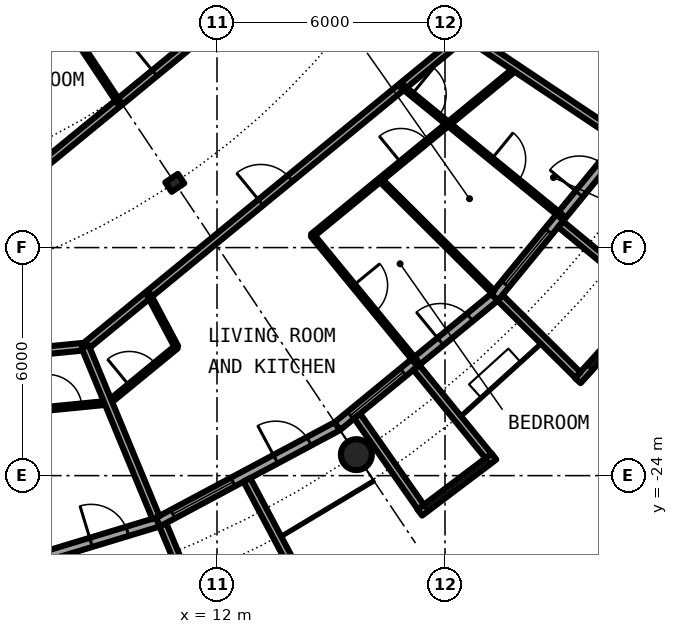
"""IFC4 building model, lengths in metres.
Left out: names, types, materials, properties, quantities, classifications, styles, units other than length and angle.
Written with IfcOpenShell. Run it as: python <this file> out.ifc"""

import sys

from ifc_helpers import new_model, si_unit, direction, frame, frame_2d, origin, origin_2d, place, context, subcontext, project, spatial, rectangle, circle, hollow_circle, i_section, extrude, element, fill, save


model = new_model("IFC4")
c1 = context("Model", 3, precision=1e-05, world=origin(), true_north=direction((0.0, 1.0)))
c2 = subcontext(c1, "Body", "Model", "MODEL_VIEW")
j1 = project(units=[si_unit("LENGTHUNIT", "METRE"), si_unit("PLANEANGLEUNIT", "RADIAN")], contexts=[c1])
p1 = place(None, origin())
s1 = spatial("IfcSite", under=j1, at=p1, CompositionType="ELEMENT")
p2 = place(p1, origin())
s2 = spatial("IfcBuilding", under=s1, at=p2, CompositionType="ELEMENT")
p3 = place(p2, frame((0.0, 0.0, 202.4)))
s3 = spatial("IfcBuildingStorey", under=s2, at=p3, CompositionType="ELEMENT", Elevation=202.4)
p4 = place(p3, frame((15.667, -23.448, 0.0), z_axis=(0.0, 0.0, 1.0), x_axis=(1.0, 0.0, 0.0)))
e1 = element("IfcColumn", 1, at=p4, inside=s3, PredefinedType="COLUMN", context=c2, shape_type="SweptSolid", body=[
    extrude(hollow_circle(Radius=0.406, WallThickness=0.03, at=origin_2d()), origin(), (0.0, 0.0, 1.0), 3.05),
])
p5 = place(p3, frame((10.889, -16.297, 0.0), z_axis=(0.0, 0.0, 1.0), x_axis=(0.55557023302, -0.831469612303, 0.0)))
e2 = element("IfcColumn", 2, at=p5, inside=s3, PredefinedType="COLUMN", context=c2, shape_type="SweptSolid", body=[
    extrude(i_section(OverallWidth=0.3, OverallDepth=0.4, WebThickness=0.013, FlangeThickness=0.024, FilletRadius=0.027, at=origin_2d()), origin(), (0.0, 0.0, 1.0), 3.05),
])
p6 = place(p3, frame((5.326, -26.775, 0.0), z_axis=(0.0, 0.0, 1.0), x_axis=(0.956965678721, 0.290201119486, 0.0)))
e3 = element("IfcWall", 3, at=p6, inside=s3, PredefinedType="SOLIDWALL", context=c2, shape_type="SweptSolid", body=[
    extrude(rectangle(XDim=5.351, YDim=0.25, at=frame_2d((2.676, 0.0))), origin(), (0.0, 0.0, 1.0), 2.7),
])
p7 = place(p6, frame((0.441, 0.0, 0.3)))
e4 = element("IfcOpeningElement", 4, at=p7, cuts=e3, PredefinedType="OPENING", context=c2, shape_type="SweptSolid", body=[
    extrude(rectangle(XDim=1.8, YDim=2.1, at=frame_2d((0.9, 1.05))), frame((0.0, 0.135, 0.0), z_axis=(0.0, -1.0, 0.0), x_axis=(1.0, 0.0, 0.0)), (0.0, 0.0, 1.0), 0.27),
])
p8 = place(p6, frame((3.51, 0.0, 0.0)))
e5 = element("IfcOpeningElement", 5, at=p8, cuts=e3, PredefinedType="OPENING", context=c2, shape_type="SweptSolid", body=[
    extrude(rectangle(XDim=1.0, YDim=2.2, at=frame_2d((0.5, 1.1))), frame((0.0, 0.135, 0.0), z_axis=(0.0, -1.0, 0.0), x_axis=(1.0, 0.0, 0.0)), (0.0, 0.0, 1.0), 0.27),
])
p9 = place(p3, frame((10.447, -25.222, 0.0), z_axis=(0.0, 0.0, 1.0), x_axis=(0.881915646801, 0.471407246368, 0.0)))
e6 = element("IfcWall", 6, at=p9, inside=s3, PredefinedType="SOLIDWALL", context=c2, shape_type="SweptSolid", body=[
    extrude(rectangle(XDim=5.352, YDim=0.25, at=frame_2d((2.676, 0.0))), origin(), (0.0, 0.0, 1.0), 2.7),
])
p10 = place(p9, frame((0.441, 0.0, 0.3)))
e7 = element("IfcOpeningElement", 7, at=p10, cuts=e6, PredefinedType="OPENING", context=c2, shape_type="SweptSolid", body=[
    extrude(rectangle(XDim=1.8, YDim=2.1, at=frame_2d((0.9, 1.05))), frame((0.0, 0.135, 0.0), z_axis=(0.0, -1.0, 0.0), x_axis=(1.0, 0.0, 0.0)), (0.0, 0.0, 1.0), 0.27),
])
p11 = place(p9, frame((3.51, 0.0, 0.0)))
e8 = element("IfcOpeningElement", 8, at=p11, cuts=e6, PredefinedType="OPENING", context=c2, shape_type="SweptSolid", body=[
    extrude(rectangle(XDim=1.0, YDim=2.2, at=frame_2d((0.5, 1.1))), frame((0.0, 0.135, 0.0), z_axis=(0.0, -1.0, 0.0), x_axis=(1.0, 0.0, 0.0)), (0.0, 0.0, 1.0), 0.27),
])
p12 = place(p3, frame((10.575, -25.295, -0.03), z_axis=(0.0, 0.0, 1.0), x_axis=(0.385697364644, -0.922625353492, 0.0)))
e9 = element("IfcWall", 9, at=p12, inside=s3, PredefinedType="SOLIDWALL", context=c2, shape_type="SweptSolid", body=[
    extrude(rectangle(XDim=2.883, YDim=0.2, at=frame_2d((1.442, 0.0))), origin(), (0.0, 0.0, 1.0), 2.73),
])
p13 = place(p3, frame((12.787, -24.113, -0.03), z_axis=(0.0, 0.0, 1.0), x_axis=(0.468365282436, -0.883534924159, 0.0)))
e10 = element("IfcWall", 10, at=p13, inside=s3, PredefinedType="SOLIDWALL", context=c2, shape_type="SweptSolid", body=[
    extrude(rectangle(XDim=3.006, YDim=0.2, at=frame_2d((1.503, 0.0))), origin(), (0.0, 0.0, 1.0), 2.73),
])
p14 = place(p3, frame((15.167, -22.699, 0.0), z_axis=(0.0, 0.0, 1.0), x_axis=(0.773019449054, 0.634382322723, 0.0)))
e11 = element("IfcWall", 11, at=p14, inside=s3, PredefinedType="SOLIDWALL", context=c2, shape_type="SweptSolid", body=[
    extrude(rectangle(XDim=5.352, YDim=0.25, at=frame_2d((2.676, 0.0))), origin(), (0.0, 0.0, 1.0), 2.7),
])
p15 = place(p14, frame((0.441, 0.0, 0.3)))
e12 = element("IfcOpeningElement", 12, at=p15, cuts=e11, PredefinedType="OPENING", context=c2, shape_type="SweptSolid", body=[
    extrude(rectangle(XDim=1.8, YDim=2.1, at=frame_2d((0.9, 1.05))), frame((0.0, 0.135, 0.0), z_axis=(0.0, -1.0, 0.0), x_axis=(1.0, 0.0, 0.0)), (0.0, 0.0, 1.0), 0.27),
])
p16 = place(p14, frame((3.51, 0.0, 0.0)))
e13 = element("IfcOpeningElement", 13, at=p16, cuts=e11, PredefinedType="OPENING", context=c2, shape_type="SweptSolid", body=[
    extrude(rectangle(XDim=1.0, YDim=2.2, at=frame_2d((0.5, 1.1))), frame((0.0, 0.135, 0.0), z_axis=(0.0, -1.0, 0.0), x_axis=(1.0, 0.0, 0.0)), (0.0, 0.0, 1.0), 0.27),
])
p17 = place(p3, frame((17.337, -24.972, -0.03), z_axis=(0.0, 0.0, 1.0), x_axis=(0.797887588059, 0.602806268067, 0.0)))
e14 = element("IfcWall", 14, at=p17, inside=s3, PredefinedType="SOLIDWALL", context=c2, shape_type="SweptSolid", body=[
    extrude(rectangle(XDim=2.447, YDim=0.2, at=frame_2d((1.223, 0.0))), origin(), (0.0, 0.0, 1.0), 2.73),
])
p18 = place(p17, frame((0.183, 0.0, 0.33)))
e15 = element("IfcOpeningElement", 15, at=p18, cuts=e14, PredefinedType="OPENING", context=c2, shape_type="SweptSolid", body=[
    extrude(circle(Radius=1.04, at=frame_2d((1.04, 1.04))), frame((0.0, 0.11, 0.0), z_axis=(0.0, -1.0, 0.0), x_axis=(1.0, 0.0, 0.0)), (0.0, 0.0, 1.0), 0.22),
])
p19 = place(p3, frame((15.688, -22.433, -0.03), z_axis=(0.0, 0.0, 1.0), x_axis=(0.573260687834, -0.819373043115, 0.0)))
e16 = element("IfcWall", 16, at=p19, inside=s3, PredefinedType="SOLIDWALL", context=c2, shape_type="SweptSolid", body=[
    extrude(rectangle(XDim=2.925, YDim=0.2, at=frame_2d((1.463, 0.0))), origin(), (0.0, 0.0, 1.0), 2.73),
])
p20 = place(p3, frame((17.246, -21.155, -0.03), z_axis=(0.0, 0.0, 1.0), x_axis=(0.631741648902, -0.775179004516, 0.0)))
e17 = element("IfcWall", 17, at=p20, inside=s3, PredefinedType="SOLIDWALL", context=c2, shape_type="SweptSolid", body=[
    extrude(rectangle(XDim=3.006, YDim=0.2, at=frame_2d((1.503, 0.0))), origin(), (0.0, 0.0, 1.0), 2.73),
])
p21 = place(p3, frame((19.304, -19.304, 0.0), z_axis=(0.0, 0.0, 1.0), x_axis=(0.634382322723, 0.773019449054, 0.0)))
e18 = element("IfcWall", 18, at=p21, inside=s3, PredefinedType="SOLIDWALL", context=c2, shape_type="SweptSolid", body=[
    extrude(rectangle(XDim=5.352, YDim=0.25, at=frame_2d((2.676, 0.0))), origin(), (0.0, 0.0, 1.0), 2.7),
])
p22 = place(p21, frame((0.441, 0.0, 0.3)))
e19 = element("IfcOpeningElement", 19, at=p22, cuts=e18, PredefinedType="OPENING", context=c2, shape_type="SweptSolid", body=[
    extrude(rectangle(XDim=1.8, YDim=2.1, at=frame_2d((0.9, 1.05))), frame((0.0, 0.135, 0.0), z_axis=(0.0, -1.0, 0.0), x_axis=(1.0, 0.0, 0.0)), (0.0, 0.0, 1.0), 0.27),
])
p23 = place(p21, frame((3.51, 0.0, 0.0)))
e20 = element("IfcOpeningElement", 20, at=p23, cuts=e18, PredefinedType="OPENING", context=c2, shape_type="SweptSolid", body=[
    extrude(rectangle(XDim=1.0, YDim=2.2, at=frame_2d((0.5, 1.1))), frame((0.0, 0.135, 0.0), z_axis=(0.0, -1.0, 0.0), x_axis=(1.0, 0.0, 0.0)), (0.0, 0.0, 1.0), 0.27),
])
p24 = place(p3, frame((21.493, -21.5, -0.03), z_axis=(0.0, 0.0, 1.0), x_axis=(0.671506829416, 0.740998365753, 0.0)))
e21 = element("IfcWall", 21, at=p24, inside=s3, PredefinedType="SOLIDWALL", context=c2, shape_type="SweptSolid", body=[
    extrude(rectangle(XDim=2.993, YDim=0.2, at=frame_2d((1.497, 0.0))), origin(), (0.0, 0.0, 1.0), 2.73),
])
p25 = place(p24, frame((0.457, 0.0, 0.33)))
e22 = element("IfcOpeningElement", 22, at=p25, cuts=e21, PredefinedType="OPENING", context=c2, shape_type="SweptSolid", body=[
    extrude(circle(Radius=1.04, at=frame_2d((1.04, 1.04))), frame((0.0, 0.11, 0.0), z_axis=(0.0, -1.0, 0.0), x_axis=(1.0, 0.0, 0.0)), (0.0, 0.0, 1.0), 0.22),
])
p26 = place(p3, frame((19.45, -19.323, -0.03), z_axis=(0.0, 0.0, 1.0), x_axis=(0.709727076896, -0.704476739375, 0.0)))
e23 = element("IfcWall", 23, at=p26, inside=s3, PredefinedType="SOLIDWALL", context=c2, shape_type="SweptSolid", body=[
    extrude(rectangle(XDim=2.883, YDim=0.2, at=frame_2d((1.441, 0.0))), origin(), (0.0, 0.0, 1.0), 2.73),
])
p27 = place(p3, frame((21.041, -17.384, -0.03), z_axis=(0.0, 0.0, 1.0), x_axis=(0.770784861449, -0.63709551667, 0.0)))
e24 = element("IfcWall", 24, at=p27, inside=s3, PredefinedType="SOLIDWALL", context=c2, shape_type="SweptSolid", body=[
    extrude(rectangle(XDim=3.006, YDim=0.2, at=frame_2d((1.503, 0.0))), origin(), (0.0, 0.0, 1.0), 2.73),
])
p28 = place(p3, frame((6.85, -22.308, 0.0), z_axis=(0.0, 0.0, 1.0), x_axis=(0.995161915602, 0.098248469375, 0.0)))
e25 = element("IfcWall", 25, at=p28, inside=s3, PredefinedType="PARTITIONING", context=c2, shape_type="SweptSolid", body=[
    extrude(rectangle(XDim=2.311, YDim=0.1, at=frame_2d((1.156, 0.0))), origin(), (0.0, 0.0, 1.0), 2.7),
])
p29 = place(p28, frame((0.701, 0.0, 0.0)))
e26 = element("IfcOpeningElement", 26, at=p29, cuts=e25, PredefinedType="OPENING", context=c2, shape_type="SweptSolid", body=[
    extrude(rectangle(XDim=0.9, YDim=2.3, at=frame_2d((0.45, 1.15))), frame((0.0, 0.06, 0.0), z_axis=(0.0, -1.0, 0.0), x_axis=(1.0, 0.0, 0.0)), (0.0, 0.0, 1.0), 0.12),
])
p30 = place(p3, frame((9.146, -22.081, 0.0), z_axis=(0.0, 0.0, 1.0), x_axis=(0.773095932958, 0.634289112663, 0.0)))
e27 = element("IfcWall", 27, at=p30, inside=s3, PredefinedType="PARTITIONING", context=c2, shape_type="SweptSolid", body=[
    extrude(rectangle(XDim=2.313, YDim=0.1, at=frame_2d((1.156, 0.0))), origin(), (0.0, 0.0, 1.0), 2.7),
])
p31 = place(p30, frame((0.706, 0.0, 0.0)))
e28 = element("IfcOpeningElement", 28, at=p31, cuts=e27, PredefinedType="OPENING", context=c2, shape_type="SweptSolid", body=[
    extrude(rectangle(XDim=0.9, YDim=2.3, at=frame_2d((0.45, 1.15))), frame((0.0, 0.06, 0.0), z_axis=(0.0, -1.0, 0.0), x_axis=(1.0, 0.0, 0.0)), (0.0, 0.0, 1.0), 0.12),
])
p32 = place(p3, frame((14.507, -17.682, 0.0), z_axis=(0.0, 0.0, 1.0), x_axis=(0.773143248755, 0.634231437966, 0.0)))
e29 = element("IfcWall", 29, at=p32, inside=s3, PredefinedType="PARTITIONING", context=c2, shape_type="SweptSolid", body=[
    extrude(rectangle(XDim=6.94, YDim=0.1, at=frame_2d((3.47, 0.0))), origin(), (0.0, 0.0, 1.0), 2.7),
])
p33 = place(p32, frame((3.021, 0.0, 0.0)))
e30 = element("IfcOpeningElement", 30, at=p33, cuts=e29, PredefinedType="OPENING", context=c2, shape_type="SweptSolid", body=[
    extrude(rectangle(XDim=0.9, YDim=2.3, at=frame_2d((0.45, 1.15))), frame((0.0, 0.06, 0.0), z_axis=(0.0, -1.0, 0.0), x_axis=(1.0, 0.0, 0.0)), (0.0, 0.0, 1.0), 0.12),
])
p34 = place(p3, frame((-4.355, -21.872, 0.0), z_axis=(0.0, 0.0, 1.0), x_axis=(0.995184945277, 0.098014920772, 0.0)))
e31 = element("IfcWall", 31, at=p34, inside=s3, PredefinedType="PARTITIONING", context=c2, shape_type="SweptSolid", body=[
    extrude(rectangle(XDim=12.958, YDim=0.2, at=frame_2d((6.479, 0.0))), origin(), (0.0, 0.0, 1.0), 2.7),
])
p35 = place(p34, frame((5.978, 0.0, 0.0)))
e32 = element("IfcOpeningElement", 32, at=p35, cuts=e31, PredefinedType="OPENING", context=c2, shape_type="SweptSolid", body=[
    extrude(rectangle(XDim=1.0, YDim=2.3, at=frame_2d((0.5, 1.15))), frame((0.0, 0.11, 0.0), z_axis=(0.0, -1.0, 0.0), x_axis=(1.0, 0.0, 0.0)), (0.0, 0.0, 1.0), 0.22),
])
p36 = place(p3, frame((8.534, -20.603, 0.0), z_axis=(0.0, 0.0, 1.0), x_axis=(0.772983503654, 0.634426121056, 0.0)))
e33 = element("IfcWall", 33, at=p36, inside=s3, PredefinedType="PARTITIONING", context=c2, shape_type="SweptSolid", body=[
    extrude(rectangle(XDim=12.947, YDim=0.2, at=frame_2d((6.474, 0.0))), origin(), (0.0, 0.0, 1.0), 2.7),
])
p37 = place(p36, frame((5.974, 0.0, 0.0)))
e34 = element("IfcOpeningElement", 34, at=p37, cuts=e33, PredefinedType="OPENING", context=c2, shape_type="SweptSolid", body=[
    extrude(rectangle(XDim=1.0, YDim=2.3, at=frame_2d((0.5, 1.15))), frame((0.0, 0.11, 0.0), z_axis=(0.0, -1.0, 0.0), x_axis=(1.0, 0.0, 0.0)), (0.0, 0.0, 1.0), 0.22),
])
p38 = place(p3, frame((6.773, -16.353, 0.0), z_axis=(0.0, 0.0, 1.0), x_axis=(0.773034536097, 0.634363938131, 0.0)))
e35 = element("IfcWall", 35, at=p38, inside=s3, PredefinedType="PARTITIONING", context=c2, shape_type="SweptSolid", body=[
    extrude(rectangle(XDim=10.277, YDim=0.2, at=frame_2d((5.138, 0.0))), origin(), (0.0, 0.0, 1.0), 2.7),
])
p39 = place(p38, frame((4.638, 0.0, 0.0)))
e36 = element("IfcOpeningElement", 36, at=p39, cuts=e35, PredefinedType="OPENING", context=c2, shape_type="SweptSolid", body=[
    extrude(rectangle(XDim=1.0, YDim=2.3, at=frame_2d((0.5, 1.15))), frame((0.0, 0.11, 0.0), z_axis=(0.0, -1.0, 0.0), x_axis=(1.0, 0.0, 0.0)), (0.0, 0.0, 1.0), 0.22),
])
p40 = place(p3, frame((7.028, -10.584, 0.0), z_axis=(0.0, 0.0, 1.0), x_axis=(0.553303732327, -0.832979579457, 0.0)))
e37 = element("IfcWall", 37, at=p40, inside=s3, PredefinedType="PARTITIONING", context=c2, shape_type="SweptSolid", body=[
    extrude(rectangle(XDim=4.319, YDim=0.1, at=frame_2d((2.16, 0.0))), origin(), (0.0, 0.0, 1.0), 2.7),
])
p41 = place(p40, frame((1.71, 0.0, 0.0)))
e38 = element("IfcOpeningElement", 38, at=p41, cuts=e37, PredefinedType="OPENING", context=c2, shape_type="SweptSolid", body=[
    extrude(rectangle(XDim=0.9, YDim=2.3, at=frame_2d((0.45, 1.15))), frame((0.0, 0.06, 0.0), z_axis=(0.0, -1.0, 0.0), x_axis=(1.0, 0.0, 0.0)), (0.0, 0.0, 1.0), 0.12),
])
p42 = place(p3, frame((8.53, -20.605, 0.0), z_axis=(0.0, 0.0, 1.0), x_axis=(0.382651153718, -0.923892902104, 0.0)))
e39 = element("IfcWall", 39, at=p42, inside=s3, PredefinedType="PARTITIONING", context=c2, shape_type="SweptSolid", body=[
    extrude(rectangle(XDim=4.874, YDim=0.2, at=frame_2d((2.437, 0.0))), origin(), (0.0, 0.0, 1.0), 2.7),
])
p43 = place(p3, frame((10.202, -19.234, 0.0), z_axis=(0.0, 0.0, 1.0), x_axis=(0.468648615763, -0.88338466986, 0.0)))
e40 = element("IfcWall", 40, at=p43, inside=s3, PredefinedType="PARTITIONING", context=c2, shape_type="SweptSolid", body=[
    extrude(rectangle(XDim=1.562, YDim=0.1, at=frame_2d((0.781, 0.0))), origin(), (0.0, 0.0, 1.0), 2.7),
])
p44 = place(p3, frame((14.509, -17.679, 0.0), z_axis=(0.0, 0.0, 1.0), x_axis=(0.634342681687, -0.77305197897, 0.0)))
e41 = element("IfcWall", 41, at=p44, inside=s3, PredefinedType="PARTITIONING", context=c2, shape_type="SweptSolid", body=[
    extrude(rectangle(XDim=4.305, YDim=0.1, at=frame_2d((2.153, 0.0))), origin(), (0.0, 0.0, 1.0), 2.7),
])
p45 = place(p44, frame((1.703, 0.0, 0.0)))
e42 = element("IfcOpeningElement", 42, at=p45, cuts=e41, PredefinedType="OPENING", context=c2, shape_type="SweptSolid", body=[
    extrude(rectangle(XDim=0.9, YDim=2.3, at=frame_2d((0.45, 1.15))), frame((0.0, 0.06, 0.0), z_axis=(0.0, -1.0, 0.0), x_axis=(1.0, 0.0, 0.0)), (0.0, 0.0, 1.0), 0.12),
])
p46 = place(p3, frame((16.295, -16.214, 0.0), z_axis=(0.0, 0.0, 1.0), x_axis=(0.709028177231, -0.705180149956, 0.0)))
e43 = element("IfcWall", 43, at=p46, inside=s3, PredefinedType="PARTITIONING", context=c2, shape_type="SweptSolid", body=[
    extrude(rectangle(XDim=4.188, YDim=0.1, at=frame_2d((2.094, 0.0))), origin(), (0.0, 0.0, 1.0), 2.7),
])
p47 = place(p3, frame((16.874, -13.758, 0.0), z_axis=(0.0, 0.0, 1.0), x_axis=(0.774926754572, -0.632051046236, 0.0)))
e44 = element("IfcWall", 44, at=p47, inside=s3, PredefinedType="PARTITIONING", context=c2, shape_type="SweptSolid", body=[
    extrude(rectangle(XDim=5.403, YDim=0.1, at=frame_2d((2.702, 0.0))), origin(), (0.0, 0.0, 1.0), 2.7),
])
p48 = place(p47, frame((0.331, 0.0, 0.0)))
e45 = element("IfcOpeningElement", 45, at=p48, cuts=e44, PredefinedType="OPENING", context=c2, shape_type="SweptSolid", body=[
    extrude(rectangle(XDim=0.9, YDim=2.3, at=frame_2d((0.45, 1.15))), frame((0.0, 0.06, 0.0), z_axis=(0.0, -1.0, 0.0), x_axis=(1.0, 0.0, 0.0)), (0.0, 0.0, 1.0), 0.12),
])
p49 = place(p47, frame((3.032, 0.0, 0.0)))
e46 = element("IfcOpeningElement", 46, at=p49, cuts=e44, PredefinedType="OPENING", context=c2, shape_type="SweptSolid", body=[
    extrude(rectangle(XDim=0.9, YDim=2.3, at=frame_2d((0.45, 1.15))), frame((0.0, 0.06, 0.0), z_axis=(0.0, -1.0, 0.0), x_axis=(1.0, 0.0, 0.0)), (0.0, 0.0, 1.0), 0.12),
])
p50 = place(p3, frame((18.542, -12.389, 0.0), z_axis=(0.0, 0.0, 1.0), x_axis=(0.831387096605, -0.55569370664, 0.0)))
e47 = element("IfcWall", 47, at=p50, inside=s3, PredefinedType="PARTITIONING", context=c2, shape_type="SweptSolid", body=[
    extrude(rectangle(XDim=4.875, YDim=0.2, at=frame_2d((2.438, 0.0))), origin(), (0.0, 0.0, 1.0), 2.7),
])
p51 = place(p8, origin())
e48 = element("IfcDoor", 48, at=p51, inside=s3, OperationType="SINGLE_SWING_LEFT", PredefinedType="DOOR", context=c2, shape_type="SweptSolid", body=[
    extrude(rectangle(XDim=1.0, YDim=2.2, at=frame_2d((0.5, 1.1))), frame((0.0, 0.025, 0.0), z_axis=(0.0, -1.0, 0.0), x_axis=(1.0, 0.0, 0.0)), (0.0, 0.0, 1.0), 0.05),
])
fill(e5, e48)
p52 = place(p10, origin())
e49 = element("IfcWindow", 49, at=p52, inside=s3, PartitioningType="SINGLE_PANEL", PredefinedType="WINDOW", context=c2, shape_type="SweptSolid", body=[
    extrude(rectangle(XDim=1.8, YDim=2.1, at=frame_2d((0.9, 1.05))), frame((0.0, 0.03, 0.0), z_axis=(0.0, -1.0, 0.0), x_axis=(1.0, 0.0, 0.0)), (0.0, 0.0, 1.0), 0.06),
])
fill(e7, e49)
p53 = place(p11, origin())
e50 = element("IfcDoor", 50, at=p53, inside=s3, OperationType="SINGLE_SWING_LEFT", PredefinedType="DOOR", context=c2, shape_type="SweptSolid", body=[
    extrude(rectangle(XDim=1.0, YDim=2.2, at=frame_2d((0.5, 1.1))), frame((0.0, 0.025, 0.0), z_axis=(0.0, -1.0, 0.0), x_axis=(1.0, 0.0, 0.0)), (0.0, 0.0, 1.0), 0.05),
])
fill(e8, e50)
p54 = place(p15, origin())
e51 = element("IfcWindow", 51, at=p54, inside=s3, PartitioningType="SINGLE_PANEL", PredefinedType="WINDOW", context=c2, shape_type="SweptSolid", body=[
    extrude(rectangle(XDim=1.8, YDim=2.1, at=frame_2d((0.9, 1.05))), frame((0.0, 0.03, 0.0), z_axis=(0.0, -1.0, 0.0), x_axis=(1.0, 0.0, 0.0)), (0.0, 0.0, 1.0), 0.06),
])
fill(e12, e51)
p55 = place(p18, origin())
e52 = element("IfcWindow", 52, at=p55, inside=s3, PartitioningType="SINGLE_PANEL", PredefinedType="WINDOW", context=c2, shape_type="SweptSolid", body=[
    extrude(circle(Radius=1.04, at=frame_2d((1.04, 1.04))), frame((0.0, 0.03, 0.0), z_axis=(0.0, -1.0, 0.0), x_axis=(1.0, 0.0, 0.0)), (0.0, 0.0, 1.0), 0.06),
])
fill(e15, e52)
p56 = place(p16, origin())
e53 = element("IfcDoor", 53, at=p56, inside=s3, OperationType="SINGLE_SWING_LEFT", PredefinedType="DOOR", context=c2, shape_type="SweptSolid", body=[
    extrude(rectangle(XDim=1.0, YDim=2.2, at=frame_2d((0.5, 1.1))), frame((0.0, 0.025, 0.0), z_axis=(0.0, -1.0, 0.0), x_axis=(1.0, 0.0, 0.0)), (0.0, 0.0, 1.0), 0.05),
])
fill(e13, e53)
p57 = place(p22, origin())
e54 = element("IfcWindow", 54, at=p57, inside=s3, PartitioningType="SINGLE_PANEL", PredefinedType="WINDOW", context=c2, shape_type="SweptSolid", body=[
    extrude(rectangle(XDim=1.8, YDim=2.1, at=frame_2d((0.9, 1.05))), frame((0.0, 0.03, 0.0), z_axis=(0.0, -1.0, 0.0), x_axis=(1.0, 0.0, 0.0)), (0.0, 0.0, 1.0), 0.06),
])
fill(e19, e54)
p58 = place(p25, origin())
e55 = element("IfcWindow", 55, at=p58, inside=s3, PartitioningType="SINGLE_PANEL", PredefinedType="WINDOW", context=c2, shape_type="SweptSolid", body=[
    extrude(circle(Radius=1.04, at=frame_2d((1.04, 1.04))), frame((0.0, 0.03, 0.0), z_axis=(0.0, -1.0, 0.0), x_axis=(1.0, 0.0, 0.0)), (0.0, 0.0, 1.0), 0.06),
])
fill(e22, e55)
p59 = place(p23, origin())
e56 = element("IfcDoor", 56, at=p59, inside=s3, OperationType="SINGLE_SWING_LEFT", PredefinedType="DOOR", context=c2, shape_type="SweptSolid", body=[
    extrude(rectangle(XDim=1.0, YDim=2.2, at=frame_2d((0.5, 1.1))), frame((0.0, 0.025, 0.0), z_axis=(0.0, -1.0, 0.0), x_axis=(1.0, 0.0, 0.0)), (0.0, 0.0, 1.0), 0.05),
])
fill(e20, e56)
p60 = place(p29, origin())
e57 = element("IfcDoor", 57, at=p60, inside=s3, OperationType="SINGLE_SWING_LEFT", PredefinedType="DOOR", context=c2, shape_type="SweptSolid", body=[
    extrude(rectangle(XDim=0.9, YDim=2.3, at=frame_2d((0.45, 1.15))), frame((0.0, 0.025, 0.0), z_axis=(0.0, -1.0, 0.0), x_axis=(1.0, 0.0, 0.0)), (0.0, 0.0, 1.0), 0.05),
])
fill(e26, e57)
p61 = place(p37, origin())
e58 = element("IfcDoor", 58, at=p61, inside=s3, OperationType="SINGLE_SWING_LEFT", PredefinedType="DOOR", context=c2, shape_type="SweptSolid", body=[
    extrude(rectangle(XDim=1.0, YDim=2.3, at=frame_2d((0.5, 1.15))), frame((0.0, 0.025, 0.0), z_axis=(0.0, -1.0, 0.0), x_axis=(1.0, 0.0, 0.0)), (0.0, 0.0, 1.0), 0.05),
])
fill(e34, e58)
p62 = place(p31, origin())
e59 = element("IfcDoor", 59, at=p62, inside=s3, OperationType="SINGLE_SWING_LEFT", PredefinedType="DOOR", context=c2, shape_type="SweptSolid", body=[
    extrude(rectangle(XDim=0.9, YDim=2.3, at=frame_2d((0.45, 1.15))), frame((0.0, 0.025, 0.0), z_axis=(0.0, -1.0, 0.0), x_axis=(1.0, 0.0, 0.0)), (0.0, 0.0, 1.0), 0.05),
])
fill(e28, e59)
p63 = place(p48, origin())
e60 = element("IfcDoor", 60, at=p63, inside=s3, OperationType="SINGLE_SWING_LEFT", PredefinedType="DOOR", context=c2, shape_type="SweptSolid", body=[
    extrude(rectangle(XDim=0.9, YDim=2.3, at=frame_2d((0.45, 1.15))), frame((0.0, 0.025, 0.0), z_axis=(0.0, -1.0, 0.0), x_axis=(1.0, 0.0, 0.0)), (0.0, 0.0, 1.0), 0.05),
])
fill(e45, e60)
p64 = place(p45, origin())
e61 = element("IfcDoor", 61, at=p64, inside=s3, OperationType="SINGLE_SWING_RIGHT", PredefinedType="DOOR", context=c2, shape_type="SweptSolid", body=[
    extrude(rectangle(XDim=0.9, YDim=2.3, at=frame_2d((0.45, 1.15))), frame((0.0, 0.025, 0.0), z_axis=(0.0, -1.0, 0.0), x_axis=(1.0, 0.0, 0.0)), (0.0, 0.0, 1.0), 0.05),
])
fill(e42, e61)
p65 = place(p33, origin())
e62 = element("IfcDoor", 62, at=p65, inside=s3, OperationType="SINGLE_SWING_RIGHT", PredefinedType="DOOR", context=c2, shape_type="SweptSolid", body=[
    extrude(rectangle(XDim=0.9, YDim=2.3, at=frame_2d((0.45, 1.15))), frame((0.0, 0.025, 0.0), z_axis=(0.0, -1.0, 0.0), x_axis=(1.0, 0.0, 0.0)), (0.0, 0.0, 1.0), 0.05),
])
fill(e30, e62)
p66 = place(p49, origin())
e63 = element("IfcDoor", 63, at=p66, inside=s3, OperationType="SINGLE_SWING_RIGHT", PredefinedType="DOOR", context=c2, shape_type="SweptSolid", body=[
    extrude(rectangle(XDim=0.9, YDim=2.3, at=frame_2d((0.45, 1.15))), frame((0.0, 0.025, 0.0), z_axis=(0.0, -1.0, 0.0), x_axis=(1.0, 0.0, 0.0)), (0.0, 0.0, 1.0), 0.05),
])
fill(e46, e63)
p67 = place(p39, origin())
e64 = element("IfcDoor", 64, at=p67, inside=s3, OperationType="SINGLE_SWING_RIGHT", PredefinedType="DOOR", context=c2, shape_type="SweptSolid", body=[
    extrude(rectangle(XDim=1.0, YDim=2.3, at=frame_2d((0.5, 1.15))), frame((0.0, 0.025, 0.0), z_axis=(0.0, -1.0, 0.0), x_axis=(1.0, 0.0, 0.0)), (0.0, 0.0, 1.0), 0.05),
])
fill(e36, e64)
save(model, sys.argv[1])
